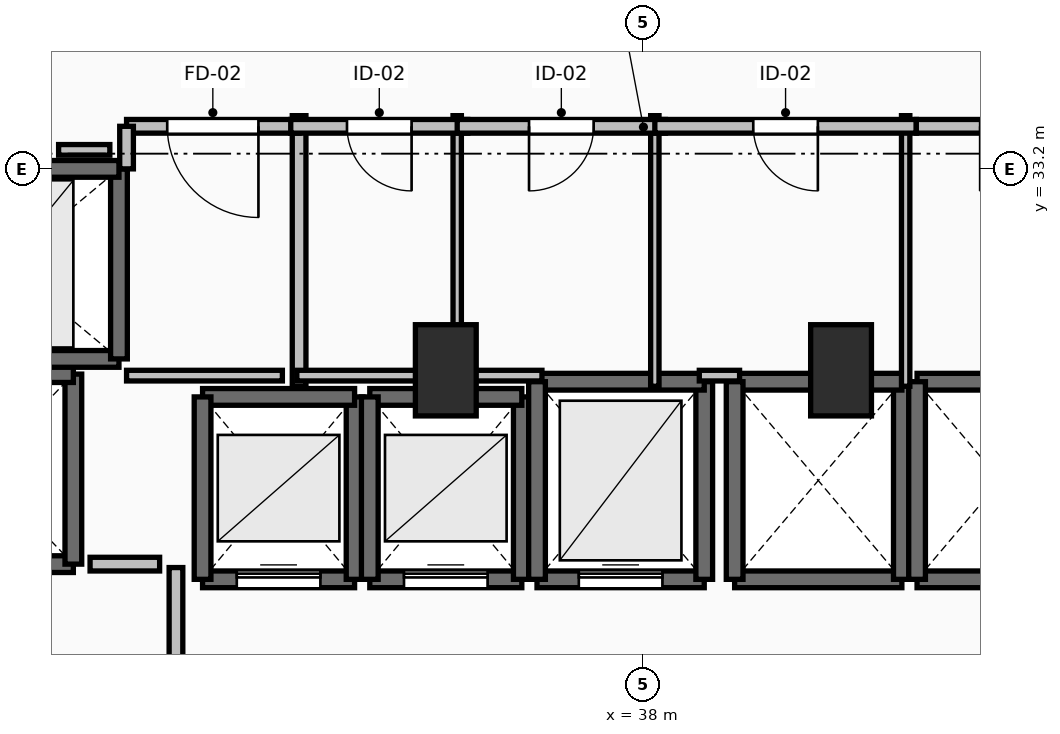
"""IFC4 building model, lengths in metres.
Left out: names, types, materials, properties, quantities, classifications, styles, units other than length and angle.
Written with IfcOpenShell. Run it as: python <this file> out.ifc"""

import sys

from ifc_helpers import new_model, si_unit, direction, frame, frame_2d, origin, origin_2d, place, context, subcontext, project, spatial, rectangle, extrude, element, fill, save


model = new_model("IFC4")
c1 = context("Model", 3, precision=1e-05, world=origin(), true_north=direction((0.0, 1.0)))
c2 = subcontext(c1, "Body", "Model", "MODEL_VIEW")
j1 = project(units=[si_unit("LENGTHUNIT", "METRE"), si_unit("PLANEANGLEUNIT", "RADIAN")], contexts=[c1])
p1 = place(None, origin())
s1 = spatial("IfcSite", under=j1, at=p1, CompositionType="ELEMENT")
p2 = place(p1, origin())
s2 = spatial("IfcBuilding", under=s1, at=p2, CompositionType="ELEMENT")
p3 = place(p2, frame((0.0, 0.0, 9.6)))
s3 = spatial("IfcBuildingStorey", under=s2, at=p3, CompositionType="ELEMENT", Elevation=9.6)
for number, where, z_axis, x_axis in (
    (1, (35.4, 30.55, 0.0), (0.0, 0.0, 1.0), (1.0, 0.0, 0.0)),
    (2, (40.6, 30.55, 0.0), (0.0, 0.0, 1.0), (1.0, 0.0, 0.0)),
):
    element("IfcColumn", number, at=place(p3, frame(where, z_axis=z_axis, x_axis=x_axis)), inside=s3, PredefinedType="PILASTER", context=c2, shape_type="SweptSolid", body=[
        extrude(rectangle(XDim=0.8, YDim=1.2, at=origin_2d()), origin(), (0.0, 0.0, 1.0), 4.8),
    ])
p4 = place(p3, frame((32.2, 27.8, 0.0), z_axis=(0.0, 0.0, 1.0), x_axis=(1.0, 0.0, 0.0)))
e3 = element("IfcWall", 3, at=p4, inside=s3, PredefinedType="SOLIDWALL", context=c2, shape_type="SweptSolid", body=[
    extrude(rectangle(XDim=2.0, YDim=0.22, at=frame_2d((1.0, 0.0))), origin(), (0.0, 0.0, 1.0), 4.48),
])
p5 = place(p4, frame((0.45, 0.0, 0.0)))
e4 = element("IfcOpeningElement", 4, at=p5, cuts=e3, PredefinedType="OPENING", context=c2, shape_type="SweptSolid", body=[
    extrude(rectangle(XDim=1.1, YDim=2.2, at=frame_2d((0.55, 1.1))), frame((0.0, 0.125, 0.0), z_axis=(0.0, -1.0, 0.0), x_axis=(1.0, 0.0, 0.0)), (0.0, 0.0, 1.0), 0.25),
])
p6 = place(p3, frame((34.2, 27.8, 0.0), z_axis=(0.0, 0.0, 1.0), x_axis=(0.0, 1.0, 0.0)))
e5 = element("IfcWall", 5, at=p6, inside=s3, PredefinedType="SOLIDWALL", context=c2, shape_type="SweptSolid", body=[
    extrude(rectangle(XDim=2.4, YDim=0.22, at=frame_2d((1.2, 0.0))), origin(), (0.0, 0.0, 1.0), 4.48),
])
p7 = place(p3, frame((34.2, 30.2, 0.0), z_axis=(0.0, 0.0, 1.0), x_axis=(-1.0, 0.0, 0.0)))
e6 = element("IfcWall", 6, at=p7, inside=s3, PredefinedType="SOLIDWALL", context=c2, shape_type="SweptSolid", body=[
    extrude(rectangle(XDim=2.0, YDim=0.22, at=frame_2d((1.0, 0.0))), origin(), (0.0, 0.0, 1.0), 4.48),
])
p8 = place(p3, frame((32.2, 30.2, 0.0), z_axis=(0.0, 0.0, 1.0), x_axis=(0.0, -1.0, 0.0)))
e7 = element("IfcWall", 7, at=p8, inside=s3, PredefinedType="SOLIDWALL", context=c2, shape_type="SweptSolid", body=[
    extrude(rectangle(XDim=2.4, YDim=0.22, at=frame_2d((1.2, 0.0))), origin(), (0.0, 0.0, 1.0), 4.48),
])
p9 = place(p3, frame((34.4, 27.8, 0.0), z_axis=(0.0, 0.0, 1.0), x_axis=(1.0, 0.0, 0.0)))
e8 = element("IfcWall", 8, at=p9, inside=s3, PredefinedType="SOLIDWALL", context=c2, shape_type="SweptSolid", body=[
    extrude(rectangle(XDim=2.0, YDim=0.22, at=frame_2d((1.0, 0.0))), origin(), (0.0, 0.0, 1.0), 4.48),
])
p10 = place(p9, frame((0.45, 0.0, 0.0)))
e9 = element("IfcOpeningElement", 9, at=p10, cuts=e8, PredefinedType="OPENING", context=c2, shape_type="SweptSolid", body=[
    extrude(rectangle(XDim=1.1, YDim=2.2, at=frame_2d((0.55, 1.1))), frame((0.0, 0.125, 0.0), z_axis=(0.0, -1.0, 0.0), x_axis=(1.0, 0.0, 0.0)), (0.0, 0.0, 1.0), 0.25),
])
p11 = place(p3, frame((36.4, 27.8, 0.0), z_axis=(0.0, 0.0, 1.0), x_axis=(0.0, 1.0, 0.0)))
e10 = element("IfcWall", 10, at=p11, inside=s3, PredefinedType="SOLIDWALL", context=c2, shape_type="SweptSolid", body=[
    extrude(rectangle(XDim=2.4, YDim=0.22, at=frame_2d((1.2, 0.0))), origin(), (0.0, 0.0, 1.0), 4.48),
])
p12 = place(p3, frame((36.4, 30.2, 0.0), z_axis=(0.0, 0.0, 1.0), x_axis=(-1.0, 0.0, 0.0)))
e11 = element("IfcWall", 11, at=p12, inside=s3, PredefinedType="SOLIDWALL", context=c2, shape_type="SweptSolid", body=[
    extrude(rectangle(XDim=2.0, YDim=0.22, at=frame_2d((1.0, 0.0))), origin(), (0.0, 0.0, 1.0), 4.48),
])
p13 = place(p3, frame((34.4, 30.2, 0.0), z_axis=(0.0, 0.0, 1.0), x_axis=(0.0, -1.0, 0.0)))
e12 = element("IfcWall", 12, at=p13, inside=s3, PredefinedType="SOLIDWALL", context=c2, shape_type="SweptSolid", body=[
    extrude(rectangle(XDim=2.4, YDim=0.22, at=frame_2d((1.2, 0.0))), origin(), (0.0, 0.0, 1.0), 4.48),
])
p14 = place(p3, frame((36.6, 27.8, 0.0), z_axis=(0.0, 0.0, 1.0), x_axis=(1.0, 0.0, 0.0)))
e13 = element("IfcWall", 13, at=p14, inside=s3, PredefinedType="SOLIDWALL", context=c2, shape_type="SweptSolid", body=[
    extrude(rectangle(XDim=2.2, YDim=0.22, at=frame_2d((1.1, 0.0))), origin(), (0.0, 0.0, 1.0), 4.48),
])
p15 = place(p14, frame((0.55, 0.0, 0.0)))
e14 = element("IfcOpeningElement", 14, at=p15, cuts=e13, PredefinedType="OPENING", context=c2, shape_type="SweptSolid", body=[
    extrude(rectangle(XDim=1.1, YDim=2.2, at=frame_2d((0.55, 1.1))), frame((0.0, 0.125, 0.0), z_axis=(0.0, -1.0, 0.0), x_axis=(1.0, 0.0, 0.0)), (0.0, 0.0, 1.0), 0.25),
])
p16 = place(p3, frame((38.8, 27.8, 0.0), z_axis=(0.0, 0.0, 1.0), x_axis=(0.0, 1.0, 0.0)))
e15 = element("IfcWall", 15, at=p16, inside=s3, PredefinedType="SOLIDWALL", context=c2, shape_type="SweptSolid", body=[
    extrude(rectangle(XDim=2.6, YDim=0.22, at=frame_2d((1.3, 0.0))), origin(), (0.0, 0.0, 1.0), 4.48),
])
p17 = place(p3, frame((38.8, 30.4, 0.0), z_axis=(0.0, 0.0, 1.0), x_axis=(-1.0, 0.0, 0.0)))
e16 = element("IfcWall", 16, at=p17, inside=s3, PredefinedType="SOLIDWALL", context=c2, shape_type="SweptSolid", body=[
    extrude(rectangle(XDim=2.2, YDim=0.22, at=frame_2d((1.1, 0.0))), origin(), (0.0, 0.0, 1.0), 4.48),
])
p18 = place(p3, frame((36.6, 30.4, 0.0), z_axis=(0.0, 0.0, 1.0), x_axis=(0.0, -1.0, 0.0)))
e17 = element("IfcWall", 17, at=p18, inside=s3, PredefinedType="SOLIDWALL", context=c2, shape_type="SweptSolid", body=[
    extrude(rectangle(XDim=2.6, YDim=0.22, at=frame_2d((1.3, 0.0))), origin(), (0.0, 0.0, 1.0), 4.48),
])
p19 = place(p3, frame((39.2, 27.8, 0.0), z_axis=(0.0, 0.0, 1.0), x_axis=(1.0, 0.0, 0.0)))
e18 = element("IfcWall", 18, at=p19, inside=s3, PredefinedType="SOLIDWALL", context=c2, shape_type="SweptSolid", body=[
    extrude(rectangle(XDim=2.2, YDim=0.22, at=frame_2d((1.1, 0.0))), origin(), (0.0, 0.0, 1.0), 4.48),
])
p20 = place(p3, frame((41.4, 27.8, 0.0), z_axis=(0.0, 0.0, 1.0), x_axis=(0.0, 1.0, 0.0)))
e19 = element("IfcWall", 19, at=p20, inside=s3, PredefinedType="SOLIDWALL", context=c2, shape_type="SweptSolid", body=[
    extrude(rectangle(XDim=2.6, YDim=0.22, at=frame_2d((1.3, 0.0))), origin(), (0.0, 0.0, 1.0), 4.48),
])
p21 = place(p3, frame((41.4, 30.4, 0.0), z_axis=(0.0, 0.0, 1.0), x_axis=(-1.0, 0.0, 0.0)))
e20 = element("IfcWall", 20, at=p21, inside=s3, PredefinedType="SOLIDWALL", context=c2, shape_type="SweptSolid", body=[
    extrude(rectangle(XDim=2.2, YDim=0.22, at=frame_2d((1.1, 0.0))), origin(), (0.0, 0.0, 1.0), 4.48),
])
p22 = place(p3, frame((39.2, 30.4, 0.0), z_axis=(0.0, 0.0, 1.0), x_axis=(0.0, -1.0, 0.0)))
e21 = element("IfcWall", 21, at=p22, inside=s3, PredefinedType="SOLIDWALL", context=c2, shape_type="SweptSolid", body=[
    extrude(rectangle(XDim=2.6, YDim=0.22, at=frame_2d((1.3, 0.0))), origin(), (0.0, 0.0, 1.0), 4.48),
])
for number, where, z_axis, x_axis in (
    (22, (41.6, 27.8, 0.0), (0.0, 0.0, 1.0), (1.0, 0.0, 0.0)),
    (23, (43.8, 30.4, 0.0), (0.0, 0.0, 1.0), (-1.0, 0.0, 0.0)),
):
    element("IfcWall", number, at=place(p3, frame(where, z_axis=z_axis, x_axis=x_axis)), inside=s3, PredefinedType="SOLIDWALL", context=c2, shape_type="SweptSolid", body=[
        extrude(rectangle(XDim=2.2, YDim=0.22, at=frame_2d((1.1, 0.0))), origin(), (0.0, 0.0, 1.0), 4.48),
    ])
p23 = place(p3, frame((41.6, 30.4, 0.0), z_axis=(0.0, 0.0, 1.0), x_axis=(0.0, -1.0, 0.0)))
e24 = element("IfcWall", 24, at=p23, inside=s3, PredefinedType="SOLIDWALL", context=c2, shape_type="SweptSolid", body=[
    extrude(rectangle(XDim=2.6, YDim=0.22, at=frame_2d((1.3, 0.0))), origin(), (0.0, 0.0, 1.0), 4.48),
])
p24 = place(p3, frame((28.1, 28.0, 0.0), z_axis=(0.0, 0.0, 1.0), x_axis=(1.0, 0.0, 0.0)))
e25 = element("IfcWall", 25, at=p24, inside=s3, PredefinedType="SHEAR", context=c2, shape_type="SweptSolid", body=[
    extrude(rectangle(XDim=2.4, YDim=0.22, at=frame_2d((1.2, 0.0))), origin(), (0.0, 0.0, 1.0), 4.48),
])
p25 = place(p24, frame((0.6, 0.0, 0.0)))
e26 = element("IfcOpeningElement", 26, at=p25, cuts=e25, PredefinedType="OPENING", context=c2, shape_type="SweptSolid", body=[
    extrude(rectangle(XDim=1.2, YDim=2.2, at=frame_2d((0.6, 1.1))), frame((0.0, 0.125, 0.0), z_axis=(0.0, -1.0, 0.0), x_axis=(1.0, 0.0, 0.0)), (0.0, 0.0, 1.0), 0.25),
])
p26 = place(p3, frame((30.5, 28.0, 0.0), z_axis=(0.0, 0.0, 1.0), x_axis=(0.0, 1.0, 0.0)))
e27 = element("IfcWall", 27, at=p26, inside=s3, PredefinedType="SHEAR", context=c2, shape_type="SweptSolid", body=[
    extrude(rectangle(XDim=2.5, YDim=0.22, at=frame_2d((1.25, 0.0))), origin(), (0.0, 0.0, 1.0), 4.48),
])
p27 = place(p3, frame((30.5, 30.5, 0.0), z_axis=(0.0, 0.0, 1.0), x_axis=(-1.0, 0.0, 0.0)))
e28 = element("IfcWall", 28, at=p27, inside=s3, PredefinedType="SHEAR", context=c2, shape_type="SweptSolid", body=[
    extrude(rectangle(XDim=2.4, YDim=0.22, at=frame_2d((1.2, 0.0))), origin(), (0.0, 0.0, 1.0), 4.48),
])
p28 = place(p3, frame((28.1, 30.7, 0.0), z_axis=(0.0, 0.0, 1.0), x_axis=(1.0, 0.0, 0.0)))
e29 = element("IfcWall", 29, at=p28, inside=s3, PredefinedType="SOLIDWALL", context=c2, shape_type="SweptSolid", body=[
    extrude(rectangle(XDim=3.0, YDim=0.22, at=frame_2d((1.5, 0.0))), origin(), (0.0, 0.0, 1.0), 4.48),
])
p29 = place(p3, frame((31.1, 30.7, 0.0), z_axis=(0.0, 0.0, 1.0), x_axis=(0.0, 1.0, 0.0)))
e30 = element("IfcWall", 30, at=p29, inside=s3, PredefinedType="SOLIDWALL", context=c2, shape_type="SweptSolid", body=[
    extrude(rectangle(XDim=2.5, YDim=0.22, at=frame_2d((1.25, 0.0))), origin(), (0.0, 0.0, 1.0), 4.48),
])
p30 = place(p3, frame((31.1, 33.2, 0.0), z_axis=(0.0, 0.0, 1.0), x_axis=(-1.0, 0.0, 0.0)))
e31 = element("IfcWall", 31, at=p30, inside=s3, PredefinedType="SOLIDWALL", context=c2, shape_type="SweptSolid", body=[
    extrude(rectangle(XDim=3.0, YDim=0.22, at=frame_2d((1.5, 0.0))), origin(), (0.0, 0.0, 1.0), 4.48),
])
p31 = place(p30, frame((0.9, 0.0, 0.0)))
e32 = element("IfcOpeningElement", 32, at=p31, cuts=e31, PredefinedType="OPENING", context=c2, shape_type="SweptSolid", body=[
    extrude(rectangle(XDim=1.2, YDim=2.2, at=frame_2d((0.6, 1.1))), frame((0.0, 0.125, 0.0), z_axis=(0.0, -1.0, 0.0), x_axis=(1.0, 0.0, 0.0)), (0.0, 0.0, 1.0), 0.25),
])
p32 = place(p3, frame((31.85, 24.045, 0.0), z_axis=(0.0, 0.0, 1.0), x_axis=(0.0, 1.0, 0.0)))
e33 = element("IfcWall", 33, at=p32, inside=s3, PredefinedType="PARTITIONING", context=c2, shape_type="SweptSolid", body=[
    extrude(rectangle(XDim=3.91, YDim=0.18, at=frame_2d((1.955, 0.0))), origin(), (0.0, 0.0, 1.0), 4.48),
])
p33 = place(p32, frame((1.355, 0.0, 0.0)))
e34 = element("IfcOpeningElement", 34, at=p33, cuts=e33, PredefinedType="OPENING", context=c2, shape_type="SweptSolid", body=[
    extrude(rectangle(XDim=1.2, YDim=2.15, at=frame_2d((0.6, 1.075))), frame((0.0, 0.105, 0.0), z_axis=(0.0, -1.0, 0.0), x_axis=(1.0, 0.0, 0.0)), (0.0, 0.0, 1.0), 0.21),
])
p34 = place(p3, frame((33.47, 30.34, 0.0), z_axis=(0.0, 0.0, 1.0), x_axis=(0.0, 1.0, 0.0)))
e35 = element("IfcWall", 35, at=p34, inside=s3, PredefinedType="PARTITIONING", context=c2, shape_type="SweptSolid", body=[
    extrude(rectangle(XDim=3.56, YDim=0.18, at=frame_2d((1.78, 0.0))), origin(), (0.0, 0.0, 1.0), 4.48),
])
p35 = place(p3, frame((33.47, 33.76, 0.0), z_axis=(0.0, 0.0, 1.0), x_axis=(-1.0, 0.0, 0.0)))
e36 = element("IfcWall", 36, at=p35, inside=s3, PredefinedType="PARTITIONING", context=c2, shape_type="SweptSolid", body=[
    extrude(rectangle(XDim=2.27, YDim=0.18, at=frame_2d((1.135, 0.0))), origin(), (0.0, 0.0, 1.0), 4.48),
])
p36 = place(p35, frame((0.535, 0.0, 0.0)))
e37 = element("IfcOpeningElement", 37, at=p36, cuts=e36, PredefinedType="OPENING", context=c2, shape_type="SweptSolid", body=[
    extrude(rectangle(XDim=1.2, YDim=2.15, at=frame_2d((0.6, 1.075))), frame((0.0, 0.105, 0.0), z_axis=(0.0, -1.0, 0.0), x_axis=(1.0, 0.0, 0.0)), (0.0, 0.0, 1.0), 0.21),
])
p37 = place(p3, frame((31.2, 33.76, 0.0), z_axis=(0.0, 0.0, 1.0), x_axis=(0.0, -1.0, 0.0)))
e38 = element("IfcWall", 38, at=p37, inside=s3, PredefinedType="PARTITIONING", context=c2, shape_type="SweptSolid", body=[
    extrude(rectangle(XDim=0.56, YDim=0.18, at=frame_2d((0.28, 0.0))), origin(), (0.0, 0.0, 1.0), 4.48),
])
p38 = place(p3, frame((35.55, 30.34, 0.0), z_axis=(0.0, 0.0, 1.0), x_axis=(0.0, 1.0, 0.0)))
e39 = element("IfcWall", 39, at=p38, inside=s3, PredefinedType="PARTITIONING", context=c2, shape_type="SweptSolid", body=[
    extrude(rectangle(XDim=3.56, YDim=0.11, at=frame_2d((1.78, 0.0))), origin(), (0.0, 0.0, 1.0), 3.672),
])
p39 = place(p3, frame((35.69, 33.76, 0.0), z_axis=(0.0, 0.0, 1.0), x_axis=(-1.0, 0.0, 0.0)))
e40 = element("IfcWall", 40, at=p39, inside=s3, PredefinedType="PARTITIONING", context=c2, shape_type="SweptSolid", body=[
    extrude(rectangle(XDim=2.33, YDim=0.18, at=frame_2d((1.165, 0.0))), origin(), (0.0, 0.0, 1.0), 4.48),
])
p40 = place(p39, frame((0.74, 0.0, 0.0)))
e41 = element("IfcOpeningElement", 41, at=p40, cuts=e40, PredefinedType="OPENING", context=c2, shape_type="SweptSolid", body=[
    extrude(rectangle(XDim=0.85, YDim=2.1, at=frame_2d((0.425, 1.05))), frame((0.0, 0.105, 0.0), z_axis=(0.0, -1.0, 0.0), x_axis=(1.0, 0.0, 0.0)), (0.0, 0.0, 1.0), 0.21),
])
p41 = place(p3, frame((38.15, 30.34, 0.0), z_axis=(0.0, 0.0, 1.0), x_axis=(0.0, 1.0, 0.0)))
e42 = element("IfcWall", 42, at=p41, inside=s3, PredefinedType="PARTITIONING", context=c2, shape_type="SweptSolid", body=[
    extrude(rectangle(XDim=3.56, YDim=0.11, at=frame_2d((1.78, 0.0))), origin(), (0.0, 0.0, 1.0), 3.672),
])
p42 = place(p3, frame((38.29, 33.76, 0.0), z_axis=(0.0, 0.0, 1.0), x_axis=(-1.0, 0.0, 0.0)))
e43 = element("IfcWall", 43, at=p42, inside=s3, PredefinedType="PARTITIONING", context=c2, shape_type="SweptSolid", body=[
    extrude(rectangle(XDim=2.74, YDim=0.18, at=frame_2d((1.37, 0.0))), origin(), (0.0, 0.0, 1.0), 4.48),
])
p43 = place(p42, frame((0.945, 0.0, 0.0)))
e44 = element("IfcOpeningElement", 44, at=p43, cuts=e43, PredefinedType="OPENING", context=c2, shape_type="SweptSolid", body=[
    extrude(rectangle(XDim=0.85, YDim=2.1, at=frame_2d((0.425, 1.05))), frame((0.0, 0.105, 0.0), z_axis=(0.0, -1.0, 0.0), x_axis=(1.0, 0.0, 0.0)), (0.0, 0.0, 1.0), 0.21),
])
p44 = place(p3, frame((41.45, 30.34, 0.0), z_axis=(0.0, 0.0, 1.0), x_axis=(0.0, 1.0, 0.0)))
e45 = element("IfcWall", 45, at=p44, inside=s3, PredefinedType="PARTITIONING", context=c2, shape_type="SweptSolid", body=[
    extrude(rectangle(XDim=3.56, YDim=0.11, at=frame_2d((1.78, 0.0))), origin(), (0.0, 0.0, 1.0), 4.48),
])
p45 = place(p3, frame((41.59, 33.76, 0.0), z_axis=(0.0, 0.0, 1.0), x_axis=(-1.0, 0.0, 0.0)))
e46 = element("IfcWall", 46, at=p45, inside=s3, PredefinedType="PARTITIONING", context=c2, shape_type="SweptSolid", body=[
    extrude(rectangle(XDim=3.44, YDim=0.18, at=frame_2d((1.72, 0.0))), origin(), (0.0, 0.0, 1.0), 4.48),
])
p46 = place(p45, frame((1.295, 0.0, 0.0)))
e47 = element("IfcOpeningElement", 47, at=p46, cuts=e46, PredefinedType="OPENING", context=c2, shape_type="SweptSolid", body=[
    extrude(rectangle(XDim=0.85, YDim=2.1, at=frame_2d((0.425, 1.05))), frame((0.0, 0.105, 0.0), z_axis=(0.0, -1.0, 0.0), x_axis=(1.0, 0.0, 0.0)), (0.0, 0.0, 1.0), 0.21),
])
p47 = place(p3, frame((44.12, 33.76, 0.0), z_axis=(0.0, 0.0, 1.0), x_axis=(-1.0, 0.0, 0.0)))
e48 = element("IfcWall", 48, at=p47, inside=s3, PredefinedType="PARTITIONING", context=c2, shape_type="SweptSolid", body=[
    extrude(rectangle(XDim=2.53, YDim=0.18, at=frame_2d((1.265, 0.0))), origin(), (0.0, 0.0, 1.0), 4.48),
])
p48 = place(p47, frame((0.84, 0.0, 0.0)))
e49 = element("IfcOpeningElement", 49, at=p48, cuts=e48, PredefinedType="OPENING", context=c2, shape_type="SweptSolid", body=[
    extrude(rectangle(XDim=0.85, YDim=2.1, at=frame_2d((0.425, 1.05))), frame((0.0, 0.105, 0.0), z_axis=(0.0, -1.0, 0.0), x_axis=(1.0, 0.0, 0.0)), (0.0, 0.0, 1.0), 0.21),
])
p49 = place(p3, frame((31.635, 28.0, 0.0), z_axis=(0.0, 0.0, 1.0), x_axis=(-1.0, 0.0, 0.0)))
e50 = element("IfcWall", 50, at=p49, inside=s3, PredefinedType="PARTITIONING", context=c2, shape_type="SweptSolid", body=[
    extrude(rectangle(XDim=0.915, YDim=0.18, at=frame_2d((0.458, 0.0))), origin(), (0.0, 0.0, 1.0), 4.48),
])
p50 = place(p3, frame((31.2, 30.48, 0.0), z_axis=(0.0, 0.0, 1.0), x_axis=(1.0, 0.0, 0.0)))
e51 = element("IfcWall", 51, at=p50, inside=s3, PredefinedType="PARTITIONING", context=c2, shape_type="SweptSolid", body=[
    extrude(rectangle(XDim=2.05, YDim=0.14, at=frame_2d((1.025, 0.0))), origin(), (0.0, 0.0, 1.0), 4.48),
])
p51 = place(p3, frame((33.44, 30.48, 0.0), z_axis=(0.0, 0.0, 1.0), x_axis=(1.0, 0.0, 0.0)))
e52 = element("IfcWall", 52, at=p51, inside=s3, PredefinedType="PARTITIONING", context=c2, shape_type="SweptSolid", body=[
    extrude(rectangle(XDim=2.14, YDim=0.14, at=frame_2d((1.07, 0.0))), origin(), (0.0, 0.0, 1.0), 3.672),
])
p52 = place(p3, frame((35.6, 30.48, 0.0), z_axis=(0.0, 0.0, 1.0), x_axis=(1.0, 0.0, 0.0)))
e53 = element("IfcWall", 53, at=p52, inside=s3, PredefinedType="PARTITIONING", context=c2, shape_type="SweptSolid", body=[
    extrude(rectangle(XDim=1.065, YDim=0.14, at=frame_2d((0.532, 0.0))), origin(), (0.0, 0.0, 1.0), 3.672),
])
p53 = place(p3, frame((38.735, 30.48, 0.0), z_axis=(0.0, 0.0, 1.0), x_axis=(1.0, 0.0, 0.0)))
e54 = element("IfcWall", 54, at=p53, inside=s3, PredefinedType="PARTITIONING", context=c2, shape_type="SweptSolid", body=[
    extrude(rectangle(XDim=0.53, YDim=0.14, at=frame_2d((0.265, 0.0))), origin(), (0.0, 0.0, 1.0), 3.672),
])
p54 = place(p3, frame((30.306, 33.45, 0.0), z_axis=(0.0, 0.0, 1.0), x_axis=(1.0, 0.0, 0.0)))
e55 = element("IfcWall", 55, at=p54, inside=s3, PredefinedType="PARTITIONING", context=c2, shape_type="SweptSolid", body=[
    extrude(rectangle(XDim=0.674, YDim=0.14, at=frame_2d((0.337, 0.0))), origin(), (0.0, 0.0, 1.0), 4.48),
])
p55 = place(p5, origin())
e56 = element("IfcDoor", 56, at=p55, inside=s3, OperationType="SLIDING_TO_LEFT", PredefinedType="DOOR", context=c2, shape_type="SweptSolid", body=[
    extrude(rectangle(XDim=1.1, YDim=2.2, at=frame_2d((0.55, 1.1))), frame((0.0, 0.025, 0.0), z_axis=(0.0, -1.0, 0.0), x_axis=(1.0, 0.0, 0.0)), (0.0, 0.0, 1.0), 0.05),
])
fill(e4, e56)
p56 = place(p10, origin())
e57 = element("IfcDoor", 57, at=p56, inside=s3, OperationType="SLIDING_TO_LEFT", PredefinedType="DOOR", context=c2, shape_type="SweptSolid", body=[
    extrude(rectangle(XDim=1.1, YDim=2.2, at=frame_2d((0.55, 1.1))), frame((0.0, 0.025, 0.0), z_axis=(0.0, -1.0, 0.0), x_axis=(1.0, 0.0, 0.0)), (0.0, 0.0, 1.0), 0.05),
])
fill(e9, e57)
p57 = place(p15, origin())
e58 = element("IfcDoor", 58, at=p57, inside=s3, OperationType="SLIDING_TO_LEFT", PredefinedType="DOOR", context=c2, shape_type="SweptSolid", body=[
    extrude(rectangle(XDim=1.1, YDim=2.2, at=frame_2d((0.55, 1.1))), frame((0.0, 0.025, 0.0), z_axis=(0.0, -1.0, 0.0), x_axis=(1.0, 0.0, 0.0)), (0.0, 0.0, 1.0), 0.05),
])
fill(e14, e58)
p58 = place(p36, origin())
e59 = element("IfcDoor", 59, at=p58, inside=s3, OperationType="SINGLE_SWING_LEFT", PredefinedType="DOOR", context=c2, shape_type="SweptSolid", body=[
    extrude(rectangle(XDim=1.2, YDim=2.15, at=frame_2d((0.6, 1.075))), frame((0.0, 0.025, 0.0), z_axis=(0.0, -1.0, 0.0), x_axis=(1.0, 0.0, 0.0)), (0.0, 0.0, 1.0), 0.05),
])
fill(e37, e59)
p59 = place(p40, origin())
e60 = element("IfcDoor", 60, at=p59, inside=s3, OperationType="SINGLE_SWING_LEFT", PredefinedType="DOOR", context=c2, shape_type="SweptSolid", body=[
    extrude(rectangle(XDim=0.85, YDim=2.1, at=frame_2d((0.425, 1.05))), frame((0.0, 0.025, 0.0), z_axis=(0.0, -1.0, 0.0), x_axis=(1.0, 0.0, 0.0)), (0.0, 0.0, 1.0), 0.05),
])
fill(e41, e60)
p60 = place(p43, origin())
e61 = element("IfcDoor", 61, at=p60, inside=s3, OperationType="SINGLE_SWING_RIGHT", PredefinedType="DOOR", context=c2, shape_type="SweptSolid", body=[
    extrude(rectangle(XDim=0.85, YDim=2.1, at=frame_2d((0.425, 1.05))), frame((0.0, 0.025, 0.0), z_axis=(0.0, -1.0, 0.0), x_axis=(1.0, 0.0, 0.0)), (0.0, 0.0, 1.0), 0.05),
])
fill(e44, e61)
p61 = place(p46, origin())
e62 = element("IfcDoor", 62, at=p61, inside=s3, OperationType="SINGLE_SWING_LEFT", PredefinedType="DOOR", context=c2, shape_type="SweptSolid", body=[
    extrude(rectangle(XDim=0.85, YDim=2.1, at=frame_2d((0.425, 1.05))), frame((0.0, 0.025, 0.0), z_axis=(0.0, -1.0, 0.0), x_axis=(1.0, 0.0, 0.0)), (0.0, 0.0, 1.0), 0.05),
])
fill(e47, e62)
save(model, sys.argv[1])
